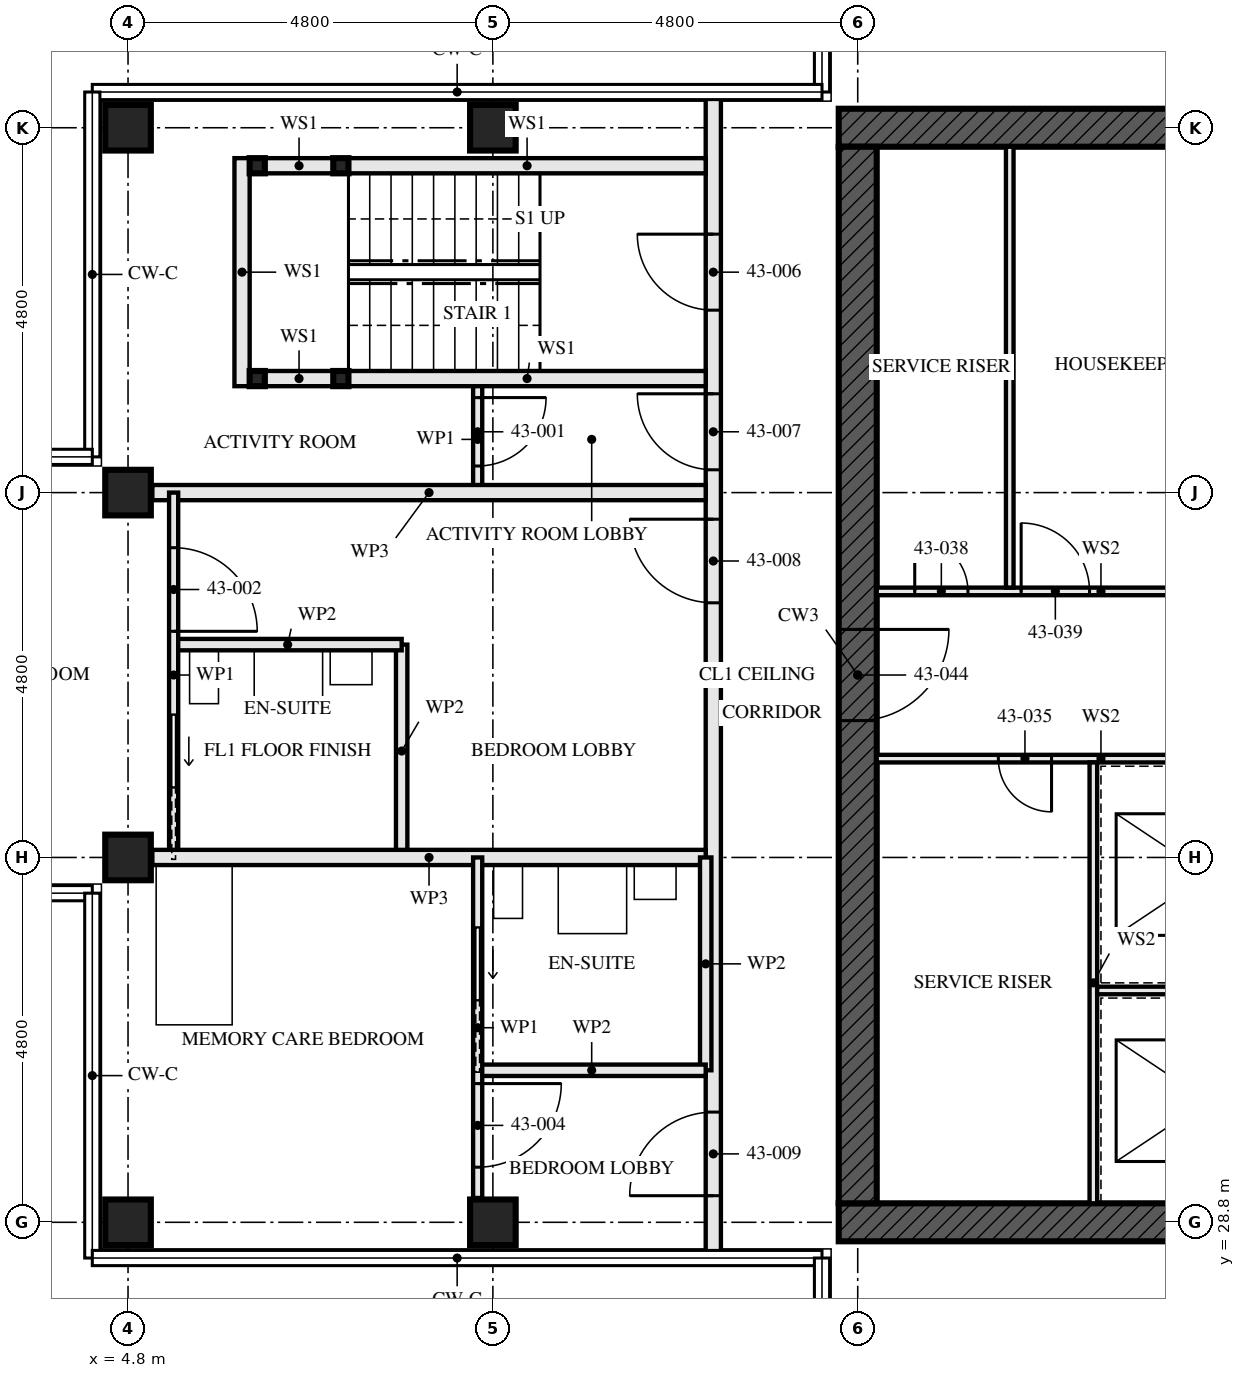
"""IFC4 building model, lengths in metres.
Left out: names, types, materials, properties, quantities, classifications, styles, units other than length and angle.
Written with IfcOpenShell. Run it as: python <this file> out.ifc"""

import sys

from ifc_helpers import new_model, si_unit, direction, frame, frame_2d, origin, origin_2d, place, context, subcontext, project, spatial, rectangle, hollow_rectangle, extrude, element, fill, save


model = new_model("IFC4")
c1 = context("Model", 3, precision=1e-05, world=origin(), true_north=direction((0.0, 1.0)))
c2 = subcontext(c1, "Body", "Model", "MODEL_VIEW")
j1 = project(units=[si_unit("LENGTHUNIT", "METRE"), si_unit("PLANEANGLEUNIT", "RADIAN")], contexts=[c1])
p1 = place(None, origin())
s1 = spatial("IfcSite", under=j1, at=p1, CompositionType="ELEMENT")
p2 = place(p1, origin())
s2 = spatial("IfcBuilding", under=s1, at=p2, CompositionType="ELEMENT")
p3 = place(p2, frame((0.0, 0.0, 158.5)))
s3 = spatial("IfcBuildingStorey", under=s2, at=p3, CompositionType="ELEMENT", Elevation=158.5)
for number, where, z_axis, x_axis in (
    (1, (4.8, 28.8, 0.0), (0.0, 0.0, 1.0), (0.0, 1.0, 0.0)),
    (2, (4.8, 33.6, 0.0), (0.0, 0.0, 1.0), (0.0, 1.0, 0.0)),
    (3, (4.8, 38.4, 0.0), (0.0, 0.0, 1.0), (0.0, 1.0, 0.0)),
    (4, (4.8, 43.2, 0.0), (0.0, 0.0, 1.0), (0.0, 1.0, 0.0)),
):
    element("IfcColumn", number, at=place(p3, frame(where, z_axis=z_axis, x_axis=x_axis)), inside=s3, PredefinedType="COLUMN", context=c2, shape_type="SweptSolid", body=[
        extrude(hollow_rectangle(XDim=0.6, YDim=0.6, WallThickness=0.06, at=origin_2d()), origin(), (0.0, 0.0, 1.0), 3.5),
    ])
for number, where, z_axis, x_axis in (
    (5, (9.6, 28.8, 0.0), (0.0, 0.0, 1.0), (0.0, 1.0, 0.0)),
    (6, (9.6, 43.2, 0.0), (0.0, 0.0, 1.0), (0.0, 1.0, 0.0)),
):
    element("IfcColumn", number, at=place(p3, frame(where, z_axis=z_axis, x_axis=x_axis)), inside=s3, PredefinedType="COLUMN", context=c2, shape_type="SweptSolid", body=[
        extrude(hollow_rectangle(XDim=0.6, YDim=0.6, WallThickness=0.08, at=origin_2d()), origin(), (0.0, 0.0, 1.0), 3.5),
    ])
p4 = place(p3, frame((14.15, 28.8, -0.17), z_axis=(0.0, 0.0, 1.0), x_axis=(1.0, 0.0, 0.0)))
e7 = element("IfcWall", 7, at=p4, inside=s3, PredefinedType="SHEAR", context=c2, shape_type="SweptSolid", body=[
    extrude(rectangle(XDim=14.9, YDim=0.5, at=frame_2d((7.45, 0.0))), origin(), (0.0, 0.0, 1.0), 3.5),
])
p5 = place(p4, frame((6.85, 0.0, 0.17)))
e8 = element("IfcOpeningElement", 8, at=p5, cuts=e7, PredefinedType="OPENING", context=c2, shape_type="SweptSolid", body=[
    extrude(rectangle(XDim=1.2, YDim=2.1, at=frame_2d((0.6, 1.05))), frame((0.0, 0.26, 0.0), z_axis=(0.0, -1.0, 0.0), x_axis=(1.0, 0.0, 0.0)), (0.0, 0.0, 1.0), 0.521),
])
p6 = place(p3, frame((29.05, 43.2, -0.17), z_axis=(0.0, 0.0, 1.0), x_axis=(-1.0, 0.0, 0.0)))
e9 = element("IfcWall", 9, at=p6, inside=s3, PredefinedType="SHEAR", context=c2, shape_type="SweptSolid", body=[
    extrude(rectangle(XDim=14.9, YDim=0.5, at=frame_2d((7.45, 0.0))), origin(), (0.0, 0.0, 1.0), 3.5),
])
p7 = place(p6, frame((6.85, 0.0, 0.17)))
e10 = element("IfcOpeningElement", 10, at=p7, cuts=e9, PredefinedType="OPENING", context=c2, shape_type="SweptSolid", body=[
    extrude(rectangle(XDim=1.2, YDim=2.1, at=frame_2d((0.6, 1.05))), frame((0.0, 0.26, 0.0), z_axis=(0.0, -1.0, 0.0), x_axis=(1.0, 0.0, 0.0)), (0.0, 0.0, 1.0), 0.521),
])
p8 = place(p3, frame((14.4, 42.95, -0.17), z_axis=(0.0, 0.0, 1.0), x_axis=(0.0, -1.0, 0.0)))
e11 = element("IfcWall", 11, at=p8, inside=s3, PredefinedType="SHEAR", context=c2, shape_type="SweptSolid", body=[
    extrude(rectangle(XDim=13.9, YDim=0.5, at=frame_2d((6.95, 0.0))), origin(), (0.0, 0.0, 1.0), 3.5),
])
p9 = place(p8, frame((6.35, 0.0, 0.17)))
e12 = element("IfcOpeningElement", 12, at=p9, cuts=e11, PredefinedType="OPENING", context=c2, shape_type="SweptSolid", body=[
    extrude(rectangle(XDim=1.2, YDim=2.1, at=frame_2d((0.6, 1.05))), frame((0.0, 0.26, 0.0), z_axis=(0.0, -1.0, 0.0), x_axis=(1.0, 0.0, 0.0)), (0.0, 0.0, 1.0), 0.521),
])
for number, where, z_axis, x_axis in (
    (13, (6.5, 42.7, 0.0), (0.0, 0.0, 1.0), (1.0, 0.0, 0.0)),
    (14, (6.5, 39.9, 0.0), (0.0, 0.0, 1.0), (1.0, 0.0, 0.0)),
    (15, (7.6, 42.7, 0.0), (0.0, 0.0, 1.0), (1.0, 0.0, 0.0)),
    (16, (7.6, 39.9, 0.0), (0.0, 0.0, 1.0), (1.0, 0.0, 0.0)),
):
    element("IfcColumn", number, at=place(p3, frame(where, z_axis=z_axis, x_axis=x_axis)), inside=s3, PredefinedType="COLUMN", context=c2, shape_type="SweptSolid", body=[
        extrude(hollow_rectangle(XDim=0.2, YDim=0.2, WallThickness=0.008, at=origin_2d()), origin(), (0.0, 0.0, 1.0), 3.33),
    ])
p10 = place(p3, frame((6.6, 42.7, 0.0), z_axis=(0.0, 0.0, 1.0), x_axis=(1.0, 0.0, 0.0)))
e17 = element("IfcWall", 17, at=p10, inside=s3, PredefinedType="SOLIDWALL", context=c2, shape_type="SweptSolid", body=[
    extrude(rectangle(XDim=0.9, YDim=0.2, at=frame_2d((0.45, 0.0))), origin(), (0.0, 0.0, 1.0), 2.99),
])
p11 = place(p3, frame((7.7, 42.7, 0.0), z_axis=(0.0, 0.0, 1.0), x_axis=(1.0, 0.0, 0.0)))
e18 = element("IfcWall", 18, at=p11, inside=s3, PredefinedType="SOLIDWALL", context=c2, shape_type="SweptSolid", body=[
    extrude(rectangle(XDim=4.7, YDim=0.2, at=frame_2d((2.35, 0.0))), origin(), (0.0, 0.0, 1.0), 2.99),
])
p12 = place(p3, frame((6.6, 39.9, 0.0), z_axis=(0.0, 0.0, 1.0), x_axis=(1.0, 0.0, 0.0)))
e19 = element("IfcWall", 19, at=p12, inside=s3, PredefinedType="SOLIDWALL", context=c2, shape_type="SweptSolid", body=[
    extrude(rectangle(XDim=0.9, YDim=0.2, at=frame_2d((0.45, 0.0))), origin(), (0.0, 0.0, 1.0), 2.99),
])
p13 = place(p3, frame((7.7, 39.9, 0.0), z_axis=(0.0, 0.0, 1.0), x_axis=(1.0, 0.0, 0.0)))
e20 = element("IfcWall", 20, at=p13, inside=s3, PredefinedType="SOLIDWALL", context=c2, shape_type="SweptSolid", body=[
    extrude(rectangle(XDim=4.7, YDim=0.2, at=frame_2d((2.35, 0.0))), origin(), (0.0, 0.0, 1.0), 2.99),
])
p14 = place(p3, frame((6.3, 42.8, 0.0), z_axis=(0.0, 0.0, 1.0), x_axis=(0.0, -1.0, 0.0)))
e21 = element("IfcWall", 21, at=p14, inside=s3, PredefinedType="SOLIDWALL", context=c2, shape_type="SweptSolid", body=[
    extrude(rectangle(XDim=3.0, YDim=0.2, at=frame_2d((1.5, 0.0))), origin(), (0.0, 0.0, 1.0), 3.33),
])
p15 = place(p3, frame((9.4, 39.8, 0.0), z_axis=(0.0, 0.0, 1.0), x_axis=(0.0, -1.0, 0.0)))
e22 = element("IfcWall", 22, at=p15, inside=s3, PredefinedType="PARTITIONING", context=c2, shape_type="SweptSolid", body=[
    extrude(rectangle(XDim=1.4, YDim=0.12, at=frame_2d((0.7, 0.0))), origin(), (0.0, 0.0, 1.0), 3.33),
])
p16 = place(p15, frame((0.15, 0.0, 0.0)))
e23 = element("IfcOpeningElement", 23, at=p16, cuts=e22, PredefinedType="OPENING", context=c2, shape_type="SweptSolid", body=[
    extrude(rectangle(XDim=0.9, YDim=2.1, at=frame_2d((0.45, 1.05))), frame((0.0, 0.071, 0.0), z_axis=(0.0, -1.0, 0.0), x_axis=(1.0, 0.0, 0.0)), (0.0, 0.0, 1.0), 0.141),
])
p17 = place(p3, frame((5.12, 38.4, 0.0), z_axis=(0.0, 0.0, 1.0), x_axis=(1.0, 0.0, 0.0)))
e24 = element("IfcWall", 24, at=p17, inside=s3, PredefinedType="PARTITIONING", context=c2, shape_type="SweptSolid", body=[
    extrude(rectangle(XDim=7.28, YDim=0.2, at=frame_2d((3.64, 0.0))), origin(), (0.0, 0.0, 1.0), 2.55),
])
p18 = place(p3, frame((5.4, 36.4, 0.0), z_axis=(0.0, 0.0, 1.0), x_axis=(1.0, 0.0, 0.0)))
e25 = element("IfcWall", 25, at=p18, inside=s3, PredefinedType="PARTITIONING", context=c2, shape_type="SweptSolid", body=[
    extrude(rectangle(XDim=3.0, YDim=0.15, at=frame_2d((1.5, 0.0))), origin(), (0.0, 0.0, 1.0), 3.33),
])
p19 = place(p3, frame((8.4, 36.4, 0.0), z_axis=(0.0, 0.0, 1.0), x_axis=(0.0, -1.0, 0.0)))
e26 = element("IfcWall", 26, at=p19, inside=s3, PredefinedType="PARTITIONING", context=c2, shape_type="SweptSolid", body=[
    extrude(rectangle(XDim=2.8, YDim=0.15, at=frame_2d((1.4, 0.0))), origin(), (0.0, 0.0, 1.0), 3.33),
])
p20 = place(p3, frame((5.4, 38.4, 0.0), z_axis=(0.0, 0.0, 1.0), x_axis=(0.0, -1.0, 0.0)))
e27 = element("IfcWall", 27, at=p20, inside=s3, PredefinedType="PARTITIONING", context=c2, shape_type="SweptSolid", body=[
    extrude(rectangle(XDim=4.8, YDim=0.12, at=frame_2d((2.4, 0.0))), origin(), (0.0, 0.0, 1.0), 3.33),
])
p21 = place(p20, frame((0.725, 0.0, 0.0)))
e28 = element("IfcOpeningElement", 28, at=p21, cuts=e27, PredefinedType="OPENING", context=c2, shape_type="SweptSolid", body=[
    extrude(rectangle(XDim=1.1, YDim=2.1, at=frame_2d((0.55, 1.05))), frame((0.0, 0.071, 0.0), z_axis=(0.0, -1.0, 0.0), x_axis=(1.0, 0.0, 0.0)), (0.0, 0.0, 1.0), 0.141),
])
p22 = place(p20, frame((2.925, 0.0, 0.0)))
e29 = element("IfcOpeningElement", 29, at=p22, cuts=e27, PredefinedType="OPENING", context=c2, shape_type="SweptSolid", body=[
    extrude(rectangle(XDim=0.95, YDim=2.1, at=frame_2d((0.475, 1.05))), frame((0.0, 0.071, 0.0), z_axis=(0.0, -1.0, 0.0), x_axis=(1.0, 0.0, 0.0)), (0.0, 0.0, 1.0), 0.141),
])
p23 = place(p3, frame((5.12, 33.6, 0.0), z_axis=(0.0, 0.0, 1.0), x_axis=(1.0, 0.0, 0.0)))
e30 = element("IfcWall", 30, at=p23, inside=s3, PredefinedType="PARTITIONING", context=c2, shape_type="SweptSolid", body=[
    extrude(rectangle(XDim=7.28, YDim=0.2, at=frame_2d((3.64, 0.0))), origin(), (0.0, 0.0, 1.0), 2.55),
])
p24 = place(p3, frame((9.4, 30.8, 0.0), z_axis=(0.0, 0.0, 1.0), x_axis=(1.0, 0.0, 0.0)))
e31 = element("IfcWall", 31, at=p24, inside=s3, PredefinedType="PARTITIONING", context=c2, shape_type="SweptSolid", body=[
    extrude(rectangle(XDim=3.0, YDim=0.15, at=frame_2d((1.5, 0.0))), origin(), (0.0, 0.0, 1.0), 3.33),
])
p25 = place(p3, frame((12.4, 33.6, 0.0), z_axis=(0.0, 0.0, 1.0), x_axis=(0.0, -1.0, 0.0)))
e32 = element("IfcWall", 32, at=p25, inside=s3, PredefinedType="PARTITIONING", context=c2, shape_type="SweptSolid", body=[
    extrude(rectangle(XDim=2.8, YDim=0.15, at=frame_2d((1.4, 0.0))), origin(), (0.0, 0.0, 1.0), 3.33),
])
p26 = place(p3, frame((9.4, 33.6, 0.0), z_axis=(0.0, 0.0, 1.0), x_axis=(0.0, -1.0, 0.0)))
e33 = element("IfcWall", 33, at=p26, inside=s3, PredefinedType="PARTITIONING", context=c2, shape_type="SweptSolid", body=[
    extrude(rectangle(XDim=4.48, YDim=0.12, at=frame_2d((2.24, 0.0))), origin(), (0.0, 0.0, 1.0), 3.33),
])
p27 = place(p26, frame((2.975, 0.0, 0.0)))
e34 = element("IfcOpeningElement", 34, at=p27, cuts=e33, PredefinedType="OPENING", context=c2, shape_type="SweptSolid", body=[
    extrude(rectangle(XDim=1.1, YDim=2.1, at=frame_2d((0.55, 1.05))), frame((0.0, 0.071, 0.0), z_axis=(0.0, -1.0, 0.0), x_axis=(1.0, 0.0, 0.0)), (0.0, 0.0, 1.0), 0.141),
])
p28 = place(p26, frame((0.925, 0.0, 0.0)))
e35 = element("IfcOpeningElement", 35, at=p28, cuts=e33, PredefinedType="OPENING", context=c2, shape_type="SweptSolid", body=[
    extrude(rectangle(XDim=0.95, YDim=2.1, at=frame_2d((0.475, 1.05))), frame((0.0, 0.071, 0.0), z_axis=(0.0, -1.0, 0.0), x_axis=(1.0, 0.0, 0.0)), (0.0, 0.0, 1.0), 0.141),
])
p29 = place(p3, frame((12.5, 43.65, 0.0), z_axis=(0.0, 0.0, 1.0), x_axis=(0.0, -1.0, 0.0)))
e36 = element("IfcWall", 36, at=p29, inside=s3, PredefinedType="PARTITIONING", context=c2, shape_type="SweptSolid", body=[
    extrude(rectangle(XDim=15.3, YDim=0.2, at=frame_2d((7.65, 0.0))), origin(), (0.0, 0.0, 1.0), 2.32),
])
p30 = place(p29, frame((1.85, 0.0, 0.0)))
e37 = element("IfcOpeningElement", 37, at=p30, cuts=e36, PredefinedType="OPENING", context=c2, shape_type="SweptSolid", body=[
    extrude(rectangle(XDim=1.0, YDim=2.1, at=frame_2d((0.5, 1.05))), frame((0.0, 0.111, 0.0), z_axis=(0.0, -1.0, 0.0), x_axis=(1.0, 0.0, 0.0)), (0.0, 0.0, 1.0), 0.221),
])
p31 = place(p29, frame((3.95, 0.0, 0.0)))
e38 = element("IfcOpeningElement", 38, at=p31, cuts=e36, PredefinedType="OPENING", context=c2, shape_type="SweptSolid", body=[
    extrude(rectangle(XDim=1.0, YDim=2.1, at=frame_2d((0.5, 1.05))), frame((0.0, 0.111, 0.0), z_axis=(0.0, -1.0, 0.0), x_axis=(1.0, 0.0, 0.0)), (0.0, 0.0, 1.0), 0.221),
])
p32 = place(p29, frame((5.6, 0.0, 0.0)))
e39 = element("IfcOpeningElement", 39, at=p32, cuts=e36, PredefinedType="OPENING", context=c2, shape_type="SweptSolid", body=[
    extrude(rectangle(XDim=1.1, YDim=2.1, at=frame_2d((0.55, 1.05))), frame((0.0, 0.111, 0.0), z_axis=(0.0, -1.0, 0.0), x_axis=(1.0, 0.0, 0.0)), (0.0, 0.0, 1.0), 0.221),
])
p33 = place(p29, frame((13.4, 0.0, 0.0)))
e40 = element("IfcOpeningElement", 40, at=p33, cuts=e36, PredefinedType="OPENING", context=c2, shape_type="SweptSolid", body=[
    extrude(rectangle(XDim=1.1, YDim=2.1, at=frame_2d((0.55, 1.05))), frame((0.0, 0.111, 0.0), z_axis=(0.0, -1.0, 0.0), x_axis=(1.0, 0.0, 0.0)), (0.0, 0.0, 1.0), 0.221),
])
p34 = place(p3, frame((16.4, 37.15, 0.0), z_axis=(0.0, 0.0, 1.0), x_axis=(0.0, 1.0, 0.0)))
e41 = element("IfcWall", 41, at=p34, inside=s3, PredefinedType="SOLIDWALL", context=c2, shape_type="SweptSolid", body=[
    extrude(rectangle(XDim=5.8, YDim=0.1, at=frame_2d((2.9, 0.0))), origin(), (0.0, 0.0, 1.0), 3.33),
])
p35 = place(p3, frame((14.65, 34.9, 0.0), z_axis=(0.0, 0.0, 1.0), x_axis=(1.0, 0.0, 0.0)))
e42 = element("IfcWall", 42, at=p35, inside=s3, PredefinedType="SOLIDWALL", context=c2, shape_type="SweptSolid", body=[
    extrude(rectangle(XDim=5.9, YDim=0.1, at=frame_2d((2.95, 0.0))), origin(), (0.0, 0.0, 1.0), 3.33),
])
p36 = place(p35, frame((1.6, 0.0, 0.0)))
e43 = element("IfcOpeningElement", 43, at=p36, cuts=e42, PredefinedType="OPENING", context=c2, shape_type="SweptSolid", body=[
    extrude(rectangle(XDim=0.7, YDim=2.1, at=frame_2d((0.35, 1.05))), frame((0.0, 0.061, 0.0), z_axis=(0.0, -1.0, 0.0), x_axis=(1.0, 0.0, 0.0)), (0.0, 0.0, 1.0), 0.121),
])
p37 = place(p3, frame((14.65, 37.1, 0.0), z_axis=(0.0, 0.0, 1.0), x_axis=(1.0, 0.0, 0.0)))
e44 = element("IfcWall", 44, at=p37, inside=s3, PredefinedType="SOLIDWALL", context=c2, shape_type="SweptSolid", body=[
    extrude(rectangle(XDim=5.9, YDim=0.1, at=frame_2d((2.95, 0.0))), origin(), (0.0, 0.0, 1.0), 3.33),
])
p38 = place(p37, frame((0.5, 0.0, 0.0)))
e45 = element("IfcOpeningElement", 45, at=p38, cuts=e44, PredefinedType="OPENING", context=c2, shape_type="SweptSolid", body=[
    extrude(rectangle(XDim=0.7, YDim=2.1, at=frame_2d((0.35, 1.05))), frame((0.0, 0.061, 0.0), z_axis=(0.0, -1.0, 0.0), x_axis=(1.0, 0.0, 0.0)), (0.0, 0.0, 1.0), 0.121),
])
p39 = place(p37, frame((1.9, 0.0, 0.0)))
e46 = element("IfcOpeningElement", 46, at=p39, cuts=e44, PredefinedType="OPENING", context=c2, shape_type="SweptSolid", body=[
    extrude(rectangle(XDim=0.9, YDim=2.1, at=frame_2d((0.45, 1.05))), frame((0.0, 0.061, 0.0), z_axis=(0.0, -1.0, 0.0), x_axis=(1.0, 0.0, 0.0)), (0.0, 0.0, 1.0), 0.121),
])
p40 = place(p3, frame((17.5, 29.05, 0.0), z_axis=(0.0, 0.0, 1.0), x_axis=(0.0, 1.0, 0.0)))
e47 = element("IfcWall", 47, at=p40, inside=s3, PredefinedType="SOLIDWALL", context=c2, shape_type="SweptSolid", body=[
    extrude(rectangle(XDim=5.8, YDim=0.1, at=frame_2d((2.9, 0.0))), origin(), (0.0, 0.0, 1.0), 3.33),
])
p41 = place(p3, frame((17.55, 31.85, 0.0), z_axis=(0.0, 0.0, 1.0), x_axis=(1.0, 0.0, 0.0)))
e48 = element("IfcWall", 48, at=p41, inside=s3, PredefinedType="SOLIDWALL", context=c2, shape_type="SweptSolid", body=[
    extrude(rectangle(XDim=2.9, YDim=0.1, at=frame_2d((1.45, 0.0))), origin(), (0.0, 0.0, 1.0), 3.33),
])
p42 = place(p16, origin())
e49 = element("IfcDoor", 49, at=p42, inside=s3, OperationType="SINGLE_SWING_RIGHT", PredefinedType="DOOR", context=c2, shape_type="SweptSolid", body=[
    extrude(rectangle(XDim=0.9, YDim=2.1, at=frame_2d((0.45, 1.05))), frame((0.0, 0.022, 0.0), z_axis=(0.0, -1.0, 0.0), x_axis=(1.0, 0.0, 0.0)), (0.0, 0.0, 1.0), 0.044),
])
fill(e23, e49)
p43 = place(p21, origin())
e50 = element("IfcDoor", 50, at=p43, inside=s3, OperationType="SINGLE_SWING_LEFT", PredefinedType="DOOR", context=c2, shape_type="SweptSolid", body=[
    extrude(rectangle(XDim=1.1, YDim=2.1, at=frame_2d((0.55, 1.05))), frame((0.0, 0.022, 0.0), z_axis=(0.0, -1.0, 0.0), x_axis=(1.0, 0.0, 0.0)), (0.0, 0.0, 1.0), 0.044),
])
fill(e28, e50)
p44 = place(p22, origin())
e51 = element("IfcDoor", 51, at=p44, inside=s3, OperationType="SLIDING_TO_LEFT", PredefinedType="DOOR", context=c2, shape_type="SweptSolid", body=[
    extrude(rectangle(XDim=0.95, YDim=2.1, at=frame_2d((0.475, 1.05))), frame((0.0, 0.022, 0.0), z_axis=(0.0, -1.0, 0.0), x_axis=(1.0, 0.0, 0.0)), (0.0, 0.0, 1.0), 0.044),
])
fill(e29, e51)
p45 = place(p27, origin())
e52 = element("IfcDoor", 52, at=p45, inside=s3, OperationType="SINGLE_SWING_RIGHT", PredefinedType="DOOR", context=c2, shape_type="SweptSolid", body=[
    extrude(rectangle(XDim=1.1, YDim=2.1, at=frame_2d((0.55, 1.05))), frame((0.0, 0.022, 0.0), z_axis=(0.0, -1.0, 0.0), x_axis=(1.0, 0.0, 0.0)), (0.0, 0.0, 1.0), 0.044),
])
fill(e34, e52)
p46 = place(p28, origin())
e53 = element("IfcDoor", 53, at=p46, inside=s3, OperationType="SLIDING_TO_LEFT", PredefinedType="DOOR", context=c2, shape_type="SweptSolid", body=[
    extrude(rectangle(XDim=0.95, YDim=2.1, at=frame_2d((0.475, 1.05))), frame((0.0, 0.022, 0.0), z_axis=(0.0, -1.0, 0.0), x_axis=(1.0, 0.0, 0.0)), (0.0, 0.0, 1.0), 0.044),
])
fill(e35, e53)
p47 = place(p30, frame((1.0, 0.0, 0.0), z_axis=(0.0, 0.0, 1.0), x_axis=(-1.0, 0.0, 0.0)))
e54 = element("IfcDoor", 54, at=p47, inside=s3, OperationType="SINGLE_SWING_LEFT", PredefinedType="DOOR", context=c2, shape_type="SweptSolid", body=[
    extrude(rectangle(XDim=1.0, YDim=2.1, at=frame_2d((0.5, 1.05))), frame((0.0, 0.032, 0.0), z_axis=(0.0, -1.0, 0.0), x_axis=(1.0, 0.0, 0.0)), (0.0, 0.0, 1.0), 0.064),
])
fill(e37, e54)
p48 = place(p31, frame((1.0, 0.0, 0.0), z_axis=(0.0, 0.0, 1.0), x_axis=(-1.0, 0.0, 0.0)))
e55 = element("IfcDoor", 55, at=p48, inside=s3, OperationType="SINGLE_SWING_LEFT", PredefinedType="DOOR", context=c2, shape_type="SweptSolid", body=[
    extrude(rectangle(XDim=1.0, YDim=2.1, at=frame_2d((0.5, 1.05))), frame((0.0, 0.027, 0.0), z_axis=(0.0, -1.0, 0.0), x_axis=(1.0, 0.0, 0.0)), (0.0, 0.0, 1.0), 0.054),
])
fill(e38, e55)
p49 = place(p32, frame((1.1, 0.0, 0.0), z_axis=(0.0, 0.0, 1.0), x_axis=(-1.0, 0.0, 0.0)))
e56 = element("IfcDoor", 56, at=p49, inside=s3, OperationType="SINGLE_SWING_LEFT", PredefinedType="DOOR", context=c2, shape_type="SweptSolid", body=[
    extrude(rectangle(XDim=1.1, YDim=2.1, at=frame_2d((0.55, 1.05))), frame((0.0, 0.027, 0.0), z_axis=(0.0, -1.0, 0.0), x_axis=(1.0, 0.0, 0.0)), (0.0, 0.0, 1.0), 0.054),
])
fill(e39, e56)
p50 = place(p33, frame((1.1, 0.0, 0.0), z_axis=(0.0, 0.0, 1.0), x_axis=(-1.0, 0.0, 0.0)))
e57 = element("IfcDoor", 57, at=p50, inside=s3, OperationType="SINGLE_SWING_RIGHT", PredefinedType="DOOR", context=c2, shape_type="SweptSolid", body=[
    extrude(rectangle(XDim=1.1, YDim=2.1, at=frame_2d((0.55, 1.05))), frame((0.0, 0.027, 0.0), z_axis=(0.0, -1.0, 0.0), x_axis=(1.0, 0.0, 0.0)), (0.0, 0.0, 1.0), 0.054),
])
fill(e40, e57)
p51 = place(p36, frame((0.7, 0.0, 0.0), z_axis=(0.0, 0.0, 1.0), x_axis=(-1.0, 0.0, 0.0)))
e58 = element("IfcDoor", 58, at=p51, inside=s3, OperationType="SINGLE_SWING_RIGHT", PredefinedType="DOOR", context=c2, shape_type="SweptSolid", body=[
    extrude(rectangle(XDim=0.7, YDim=2.1, at=frame_2d((0.35, 1.05))), frame((0.0, 0.027, 0.0), z_axis=(0.0, -1.0, 0.0), x_axis=(1.0, 0.0, 0.0)), (0.0, 0.0, 1.0), 0.054),
])
fill(e43, e58)
p52 = place(p38, origin())
e59 = element("IfcDoor", 59, at=p52, inside=s3, OperationType="SINGLE_SWING_RIGHT", PredefinedType="DOOR", context=c2, shape_type="SweptSolid", body=[
    extrude(rectangle(XDim=0.7, YDim=2.1, at=frame_2d((0.35, 1.05))), frame((0.0, 0.027, 0.0), z_axis=(0.0, -1.0, 0.0), x_axis=(1.0, 0.0, 0.0)), (0.0, 0.0, 1.0), 0.054),
])
fill(e45, e59)
p53 = place(p39, origin())
e60 = element("IfcDoor", 60, at=p53, inside=s3, OperationType="SINGLE_SWING_RIGHT", PredefinedType="DOOR", context=c2, shape_type="SweptSolid", body=[
    extrude(rectangle(XDim=0.9, YDim=2.1, at=frame_2d((0.45, 1.05))), frame((0.0, 0.027, 0.0), z_axis=(0.0, -1.0, 0.0), x_axis=(1.0, 0.0, 0.0)), (0.0, 0.0, 1.0), 0.054),
])
fill(e46, e60)
p54 = place(p9, origin())
e61 = element("IfcDoor", 61, at=p54, inside=s3, OperationType="SINGLE_SWING_LEFT", PredefinedType="DOOR", context=c2, shape_type="SweptSolid", body=[
    extrude(rectangle(XDim=1.2, YDim=2.1, at=frame_2d((0.6, 1.05))), frame((0.0, 0.027, 0.0), z_axis=(0.0, -1.0, 0.0), x_axis=(1.0, 0.0, 0.0)), (0.0, 0.0, 1.0), 0.054),
])
fill(e12, e61)
save(model, sys.argv[1])
